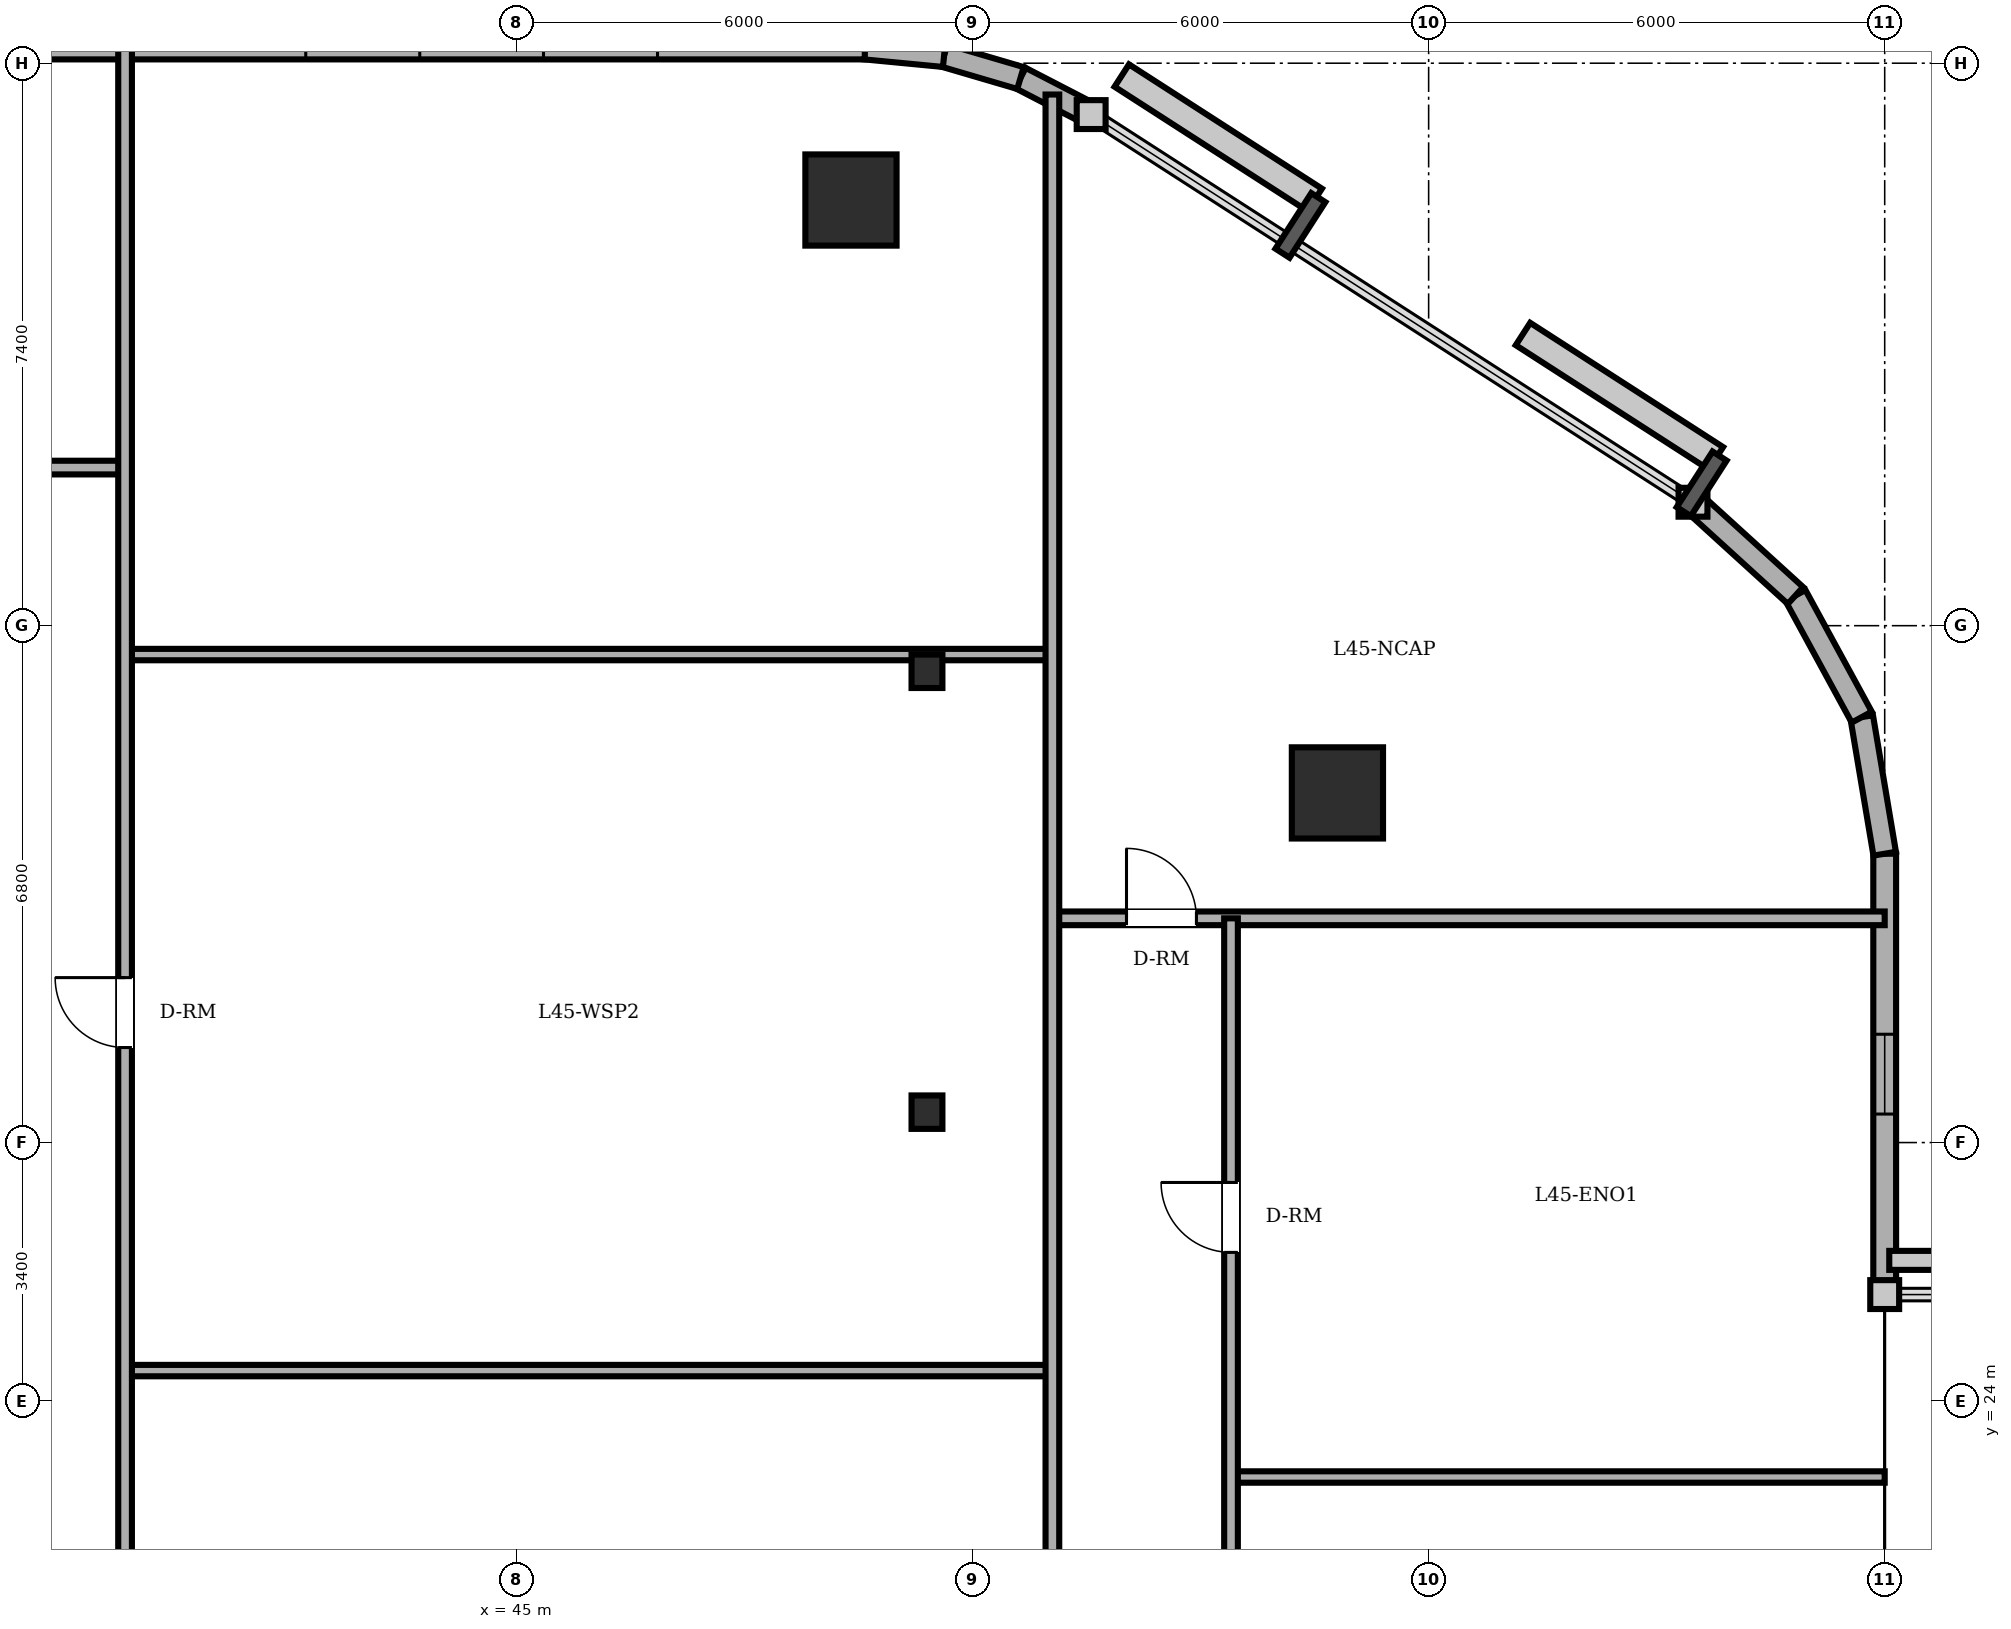
"""IFC4 building model, lengths in metres.
Left out: names, types, materials, properties, quantities, classifications, styles, units other than length and angle.
Written with IfcOpenShell. Run it as: python <this file> out.ifc"""

import sys

from ifc_helpers import new_model, si_unit, direction, frame, frame_2d, origin, origin_2d, place, context, subcontext, project, spatial, rectangle, circle, i_section, extrude, element, fill, save


model = new_model("IFC4")
c1 = context("Model", 3, precision=1e-05, world=origin(), true_north=direction((0.0, 1.0)))
c2 = subcontext(c1, "Body", "Model", "MODEL_VIEW")
j1 = project(units=[si_unit("LENGTHUNIT", "METRE"), si_unit("PLANEANGLEUNIT", "RADIAN")], contexts=[c1])
p1 = place(None, origin())
s1 = spatial("IfcSite", under=j1, at=p1, CompositionType="ELEMENT")
p2 = place(p1, origin())
s2 = spatial("IfcBuilding", under=s1, at=p2, CompositionType="ELEMENT")
p3 = place(p2, frame((0.0, 0.0, 172.6)))
s3 = spatial("IfcBuildingStorey", under=s2, at=p3, CompositionType="ELEMENT", Elevation=172.6)
for number, where, z_axis, x_axis in (
    (1, (55.8, 32.0, 0.0), (0.0, 0.0, 1.0), (1.0, 0.0, 0.0)),
    (2, (49.4, 39.8, 0.0), (0.0, 0.0, 1.0), (1.0, 0.0, 0.0)),
):
    element("IfcColumn", number, at=place(p3, frame(where, z_axis=z_axis, x_axis=x_axis)), inside=s3, PredefinedType="COLUMN", context=c2, shape_type="SweptSolid", body=[
        extrude(circle(Radius=0.6, at=origin_2d()), origin(), (0.0, 0.0, 1.0), 3.6),
    ])
for number, where, z_axis, x_axis in (
    (3, (50.4, 27.8, 0.0), (0.0, 0.0, 1.0), (1.0, 0.0, 0.0)),
    (4, (50.4, 33.6, 0.0), (0.0, 0.0, 1.0), (1.0, 0.0, 0.0)),
):
    element("IfcColumn", number, at=place(p3, frame(where, z_axis=z_axis, x_axis=x_axis)), inside=s3, PredefinedType="COLUMN", context=c2, shape_type="SweptSolid", body=[
        extrude(i_section(OverallWidth=0.406, OverallDepth=0.44, WebThickness=0.024, FlangeThickness=0.039, FilletRadius=0.015, at=origin_2d()), origin(), (0.0, 0.0, 1.0), 3.6),
    ])
p4 = place(p3, frame((63.0, 25.4, 0.0), z_axis=(0.0, 0.0, 1.0), x_axis=(0.0, 1.0, 0.0)))
e5 = element("IfcWall", 5, at=p4, inside=s3, PredefinedType="SOLIDWALL", context=c2, shape_type="SweptSolid", body=[
    extrude(rectangle(XDim=5.8, YDim=0.3, at=frame_2d((2.9, 0.0))), origin(), (0.0, 0.0, 1.0), 3.4),
])
p5 = place(p4, frame((2.375, 0.0, 0.85)))
e6 = element("IfcOpeningElement", 6, at=p5, cuts=e5, PredefinedType="OPENING", context=c2, shape_type="SweptSolid", body=[
    extrude(rectangle(XDim=1.05, YDim=1.55, at=frame_2d((0.525, 0.775))), frame((0.0, 0.16, 0.0), z_axis=(0.0, -1.0, 0.0), x_axis=(1.0, 0.0, 0.0)), (0.0, 0.0, 1.0), 0.32),
])
p6 = place(p3, frame((63.0, 31.2, 0.0), z_axis=(0.0, 0.0, 1.0), x_axis=(-0.165724081207, 0.986172159873, 0.0)))
e7 = element("IfcWall", 7, at=p6, inside=s3, PredefinedType="SOLIDWALL", context=c2, shape_type="SweptSolid", body=[
    extrude(rectangle(XDim=1.822, YDim=0.3, at=frame_2d((0.911, 0.0))), origin(), (0.0, 0.0, 1.0), 3.4),
])
p7 = place(p3, frame((62.698, 32.997, 0.0), z_axis=(0.0, 0.0, 1.0), x_axis=(-0.478608030646, 0.878028674362, 0.0)))
e8 = element("IfcWall", 8, at=p7, inside=s3, PredefinedType="SOLIDWALL", context=c2, shape_type="SweptSolid", body=[
    extrude(rectangle(XDim=1.822, YDim=0.3, at=frame_2d((0.911, 0.0))), origin(), (0.0, 0.0, 1.0), 3.4),
])
p8 = place(p3, frame((61.826, 34.597, 0.0), z_axis=(0.0, 0.0, 1.0), x_axis=(-0.73947929393, 0.673179302897, 0.0)))
e9 = element("IfcWall", 9, at=p8, inside=s3, PredefinedType="SOLIDWALL", context=c2, shape_type="SweptSolid", body=[
    extrude(rectangle(XDim=1.823, YDim=0.3, at=frame_2d((0.911, 0.0))), origin(), (0.0, 0.0, 1.0), 3.4),
])
p9 = place(p3, frame((52.56, 40.924, 0.0), z_axis=(0.0, 0.0, 1.0), x_axis=(-0.888283247196, 0.459296062198, 0.0)))
e10 = element("IfcWall", 10, at=p9, inside=s3, PredefinedType="SOLIDWALL", context=c2, shape_type="SweptSolid", body=[
    extrude(rectangle(XDim=1.047, YDim=0.3, at=frame_2d((0.523, 0.0))), origin(), (0.0, 0.0, 1.0), 3.4),
])
p10 = place(p3, frame((51.63, 41.405, 0.0), z_axis=(0.0, 0.0, 1.0), x_axis=(-0.959528674476, 0.281610942363, 0.0)))
e11 = element("IfcWall", 11, at=p10, inside=s3, PredefinedType="SOLIDWALL", context=c2, shape_type="SweptSolid", body=[
    extrude(rectangle(XDim=1.047, YDim=0.3, at=frame_2d((0.524, 0.0))), origin(), (0.0, 0.0, 1.0), 3.4),
])
p11 = place(p3, frame((50.625, 41.7, 0.0), z_axis=(0.0, 0.0, 1.0), x_axis=(-0.995426089968, 0.095534807324, 0.0)))
e12 = element("IfcWall", 12, at=p11, inside=s3, PredefinedType="SOLIDWALL", context=c2, shape_type="SweptSolid", body=[
    extrude(rectangle(XDim=1.048, YDim=0.3, at=frame_2d((0.524, 0.0))), origin(), (0.0, 0.0, 1.0), 3.4),
])
p12 = place(p3, frame((49.582, 41.8, 0.0), z_axis=(0.0, 0.0, 1.0), x_axis=(-1.0, 0.0, 0.0)))
e13 = element("IfcWall", 13, at=p12, inside=s3, PredefinedType="SOLIDWALL", context=c2, shape_type="SweptSolid", body=[
    extrude(rectangle(XDim=30.282, YDim=0.3, at=frame_2d((15.141, 0.0))), origin(), (0.0, 0.0, 1.0), 3.4),
])
p13 = place(p12, frame((25.407, 0.0, 0.0)))
e14 = element("IfcOpeningElement", 14, at=p13, cuts=e13, PredefinedType="OPENING", context=c2, shape_type="SweptSolid", body=[
    extrude(rectangle(XDim=0.95, YDim=2.2, at=frame_2d((0.475, 1.1))), frame((0.0, 0.16, 0.0), z_axis=(0.0, -1.0, 0.0), x_axis=(1.0, 0.0, 0.0)), (0.0, 0.0, 1.0), 0.32),
])
p14 = place(p12, frame((2.727, 0.0, 0.85)))
e15 = element("IfcOpeningElement", 15, at=p14, cuts=e13, PredefinedType="OPENING", context=c2, shape_type="SweptSolid", body=[
    extrude(rectangle(XDim=1.5, YDim=1.55, at=frame_2d((0.75, 0.775))), frame((0.0, 0.16, 0.0), z_axis=(0.0, -1.0, 0.0), x_axis=(1.0, 0.0, 0.0)), (0.0, 0.0, 1.0), 0.32),
])
p15 = place(p12, frame((5.855, 0.0, 0.85)))
e16 = element("IfcOpeningElement", 16, at=p15, cuts=e13, PredefinedType="OPENING", context=c2, shape_type="SweptSolid", body=[
    extrude(rectangle(XDim=1.5, YDim=1.55, at=frame_2d((0.75, 0.775))), frame((0.0, 0.16, 0.0), z_axis=(0.0, -1.0, 0.0), x_axis=(1.0, 0.0, 0.0)), (0.0, 0.0, 1.0), 0.32),
])
p16 = place(p12, frame((11.665, 0.0, 0.85)))
e17 = element("IfcOpeningElement", 17, at=p16, cuts=e13, PredefinedType="OPENING", context=c2, shape_type="SweptSolid", body=[
    extrude(rectangle(XDim=1.5, YDim=1.55, at=frame_2d((0.75, 0.775))), frame((0.0, 0.16, 0.0), z_axis=(0.0, -1.0, 0.0), x_axis=(1.0, 0.0, 0.0)), (0.0, 0.0, 1.0), 0.32),
])
p17 = place(p12, frame((14.349, 0.0, 0.85)))
e18 = element("IfcOpeningElement", 18, at=p17, cuts=e13, PredefinedType="OPENING", context=c2, shape_type="SweptSolid", body=[
    extrude(rectangle(XDim=1.5, YDim=1.55, at=frame_2d((0.75, 0.775))), frame((0.0, 0.16, 0.0), z_axis=(0.0, -1.0, 0.0), x_axis=(1.0, 0.0, 0.0)), (0.0, 0.0, 1.0), 0.32),
])
p18 = place(p12, frame((18.932, 0.0, 0.85)))
e19 = element("IfcOpeningElement", 19, at=p18, cuts=e13, PredefinedType="OPENING", context=c2, shape_type="SweptSolid", body=[
    extrude(rectangle(XDim=1.5, YDim=1.55, at=frame_2d((0.75, 0.775))), frame((0.0, 0.16, 0.0), z_axis=(0.0, -1.0, 0.0), x_axis=(1.0, 0.0, 0.0)), (0.0, 0.0, 1.0), 0.32),
])
p19 = place(p12, frame((22.532, 0.0, 0.85)))
e20 = element("IfcOpeningElement", 20, at=p19, cuts=e13, PredefinedType="OPENING", context=c2, shape_type="SweptSolid", body=[
    extrude(rectangle(XDim=1.5, YDim=1.55, at=frame_2d((0.75, 0.775))), frame((0.0, 0.16, 0.0), z_axis=(0.0, -1.0, 0.0), x_axis=(1.0, 0.0, 0.0)), (0.0, 0.0, 1.0), 0.32),
])
p20 = place(p12, frame((27.532, 0.0, 0.85)))
e21 = element("IfcOpeningElement", 21, at=p20, cuts=e13, PredefinedType="OPENING", context=c2, shape_type="SweptSolid", body=[
    extrude(rectangle(XDim=1.5, YDim=1.55, at=frame_2d((0.75, 0.775))), frame((0.0, 0.16, 0.0), z_axis=(0.0, -1.0, 0.0), x_axis=(1.0, 0.0, 0.0)), (0.0, 0.0, 1.0), 0.32),
])
p21 = place(p3, frame((54.4, 23.0, 0.0), z_axis=(0.0, 0.0, 1.0), x_axis=(1.0, 0.0, 0.0)))
e22 = element("IfcWall", 22, at=p21, inside=s3, PredefinedType="PARTITIONING", context=c2, shape_type="SweptSolid", body=[
    extrude(rectangle(XDim=8.6, YDim=0.15, at=frame_2d((4.3, 0.0))), origin(), (0.0, 0.0, 1.0), 3.4),
])
p22 = place(p3, frame((39.85, 24.4, 0.0), z_axis=(0.0, 0.0, 1.0), x_axis=(1.0, 0.0, 0.0)))
e23 = element("IfcWall", 23, at=p22, inside=s3, PredefinedType="PARTITIONING", context=c2, shape_type="SweptSolid", body=[
    extrude(rectangle(XDim=12.2, YDim=0.15, at=frame_2d((6.1, 0.0))), origin(), (0.0, 0.0, 1.0), 3.4),
])
p23 = place(p3, frame((52.05, 30.35, 0.0), z_axis=(0.0, 0.0, 1.0), x_axis=(1.0, 0.0, 0.0)))
e24 = element("IfcWall", 24, at=p23, inside=s3, PredefinedType="PARTITIONING", context=c2, shape_type="SweptSolid", body=[
    extrude(rectangle(XDim=10.95, YDim=0.18, at=frame_2d((5.475, 0.0))), origin(), (0.0, 0.0, 1.0), 3.4),
])
p24 = place(p23, frame((0.975, 0.0, 0.0)))
e25 = element("IfcOpeningElement", 25, at=p24, cuts=e24, PredefinedType="OPENING", context=c2, shape_type="SweptSolid", body=[
    extrude(rectangle(XDim=0.92, YDim=2.1, at=frame_2d((0.46, 1.05))), frame((0.0, 0.1, 0.0), z_axis=(0.0, -1.0, 0.0), x_axis=(1.0, 0.0, 0.0)), (0.0, 0.0, 1.0), 0.2),
])
p25 = place(p3, frame((39.85, 33.82, 0.0), z_axis=(0.0, 0.0, 1.0), x_axis=(1.0, 0.0, 0.0)))
e26 = element("IfcWall", 26, at=p25, inside=s3, PredefinedType="PARTITIONING", context=c2, shape_type="SweptSolid", body=[
    extrude(rectangle(XDim=12.2, YDim=0.15, at=frame_2d((6.1, 0.0))), origin(), (0.0, 0.0, 1.0), 2.932),
])
p26 = place(p3, frame((13.8, 36.28, 0.0), z_axis=(0.0, 0.0, 1.0), x_axis=(1.0, 0.0, 0.0)))
e27 = element("IfcWall", 27, at=p26, inside=s3, PredefinedType="PARTITIONING", context=c2, shape_type="SweptSolid", body=[
    extrude(rectangle(XDim=26.05, YDim=0.18, at=frame_2d((13.025, 0.0))), origin(), (0.0, 0.0, 1.0), 3.4),
])
p27 = place(p26, frame((12.05, 0.0, 0.0)))
e28 = element("IfcOpeningElement", 28, at=p27, cuts=e27, PredefinedType="OPENING", context=c2, shape_type="SweptSolid", body=[
    extrude(rectangle(XDim=0.9, YDim=2.1, at=frame_2d((0.45, 1.05))), frame((0.0, 0.1, 0.0), z_axis=(0.0, -1.0, 0.0), x_axis=(1.0, 0.0, 0.0)), (0.0, 0.0, 1.0), 0.2),
])
p28 = place(p26, frame((15.67, 0.0, 0.0)))
e29 = element("IfcOpeningElement", 29, at=p28, cuts=e27, PredefinedType="OPENING", context=c2, shape_type="SweptSolid", body=[
    extrude(rectangle(XDim=0.86, YDim=2.1, at=frame_2d((0.43, 1.05))), frame((0.0, 0.1, 0.0), z_axis=(0.0, -1.0, 0.0), x_axis=(1.0, 0.0, 0.0)), (0.0, 0.0, 1.0), 0.2),
])
p29 = place(p26, frame((5.54, 0.0, 0.0)))
e30 = element("IfcOpeningElement", 30, at=p29, cuts=e27, PredefinedType="OPENING", context=c2, shape_type="SweptSolid", body=[
    extrude(rectangle(XDim=0.92, YDim=2.1, at=frame_2d((0.46, 1.05))), frame((0.0, 0.1, 0.0), z_axis=(0.0, -1.0, 0.0), x_axis=(1.0, 0.0, 0.0)), (0.0, 0.0, 1.0), 0.2),
])
p30 = place(p26, frame((21.305, 0.0, 0.0)))
e31 = element("IfcOpeningElement", 31, at=p30, cuts=e27, PredefinedType="OPENING", context=c2, shape_type="SweptSolid", body=[
    extrude(rectangle(XDim=0.92, YDim=2.1, at=frame_2d((0.46, 1.05))), frame((0.0, 0.1, 0.0), z_axis=(0.0, -1.0, 0.0), x_axis=(1.0, 0.0, 0.0)), (0.0, 0.0, 1.0), 0.2),
])
p31 = place(p3, frame((39.85, 14.18, 0.0), z_axis=(0.0, 0.0, 1.0), x_axis=(0.0, 1.0, 0.0)))
e32 = element("IfcWall", 32, at=p31, inside=s3, PredefinedType="PARTITIONING", context=c2, shape_type="SweptSolid", body=[
    extrude(rectangle(XDim=27.62, YDim=0.18, at=frame_2d((13.81, 0.0))), origin(), (0.0, 0.0, 1.0), 3.4),
])
p32 = place(p31, frame((14.47, 0.0, 0.0)))
e33 = element("IfcOpeningElement", 33, at=p32, cuts=e32, PredefinedType="OPENING", context=c2, shape_type="SweptSolid", body=[
    extrude(rectangle(XDim=0.92, YDim=2.1, at=frame_2d((0.46, 1.05))), frame((0.0, 0.1, 0.0), z_axis=(0.0, -1.0, 0.0), x_axis=(1.0, 0.0, 0.0)), (0.0, 0.0, 1.0), 0.2),
])
p33 = place(p3, frame((52.05, 14.18, 0.0), z_axis=(0.0, 0.0, 1.0), x_axis=(0.0, 1.0, 0.0)))
e34 = element("IfcWall", 34, at=p33, inside=s3, PredefinedType="PARTITIONING", context=c2, shape_type="SweptSolid", body=[
    extrude(rectangle(XDim=27.008, YDim=0.18, at=frame_2d((13.504, 0.0))), origin(), (0.0, 0.0, 1.0), 3.4),
])
p34 = place(p3, frame((54.4, 8.261, 0.0), z_axis=(0.0, 0.0, 1.0), x_axis=(0.0, 1.0, 0.0)))
e35 = element("IfcWall", 35, at=p34, inside=s3, PredefinedType="PARTITIONING", context=c2, shape_type="SweptSolid", body=[
    extrude(rectangle(XDim=22.089, YDim=0.18, at=frame_2d((11.044, 0.0))), origin(), (0.0, 0.0, 1.0), 3.4),
])
p35 = place(p34, frame((17.694, 0.0, 0.0)))
e36 = element("IfcOpeningElement", 36, at=p35, cuts=e35, PredefinedType="OPENING", context=c2, shape_type="SweptSolid", body=[
    extrude(rectangle(XDim=0.92, YDim=2.1, at=frame_2d((0.46, 1.05))), frame((0.0, 0.1, 0.0), z_axis=(0.0, -1.0, 0.0), x_axis=(1.0, 0.0, 0.0)), (0.0, 0.0, 1.0), 0.2),
])
p36 = place(p34, frame((10.771, 0.0, 0.0)))
e37 = element("IfcOpeningElement", 37, at=p36, cuts=e35, PredefinedType="OPENING", context=c2, shape_type="SweptSolid", body=[
    extrude(rectangle(XDim=0.92, YDim=2.1, at=frame_2d((0.46, 1.05))), frame((0.0, 0.1, 0.0), z_axis=(0.0, -1.0, 0.0), x_axis=(1.0, 0.0, 0.0)), (0.0, 0.0, 1.0), 0.2),
])
p37 = place(p5, origin())
e38 = element("IfcWindow", 38, at=p37, inside=s3, PartitioningType="SINGLE_PANEL", PredefinedType="WINDOW", context=c2, shape_type="SweptSolid", body=[
    extrude(rectangle(XDim=1.05, YDim=1.55, at=frame_2d((0.525, 0.775))), frame((0.0, 0.03, 0.0), z_axis=(0.0, -1.0, 0.0), x_axis=(1.0, 0.0, 0.0)), (0.0, 0.0, 1.0), 0.06),
])
fill(e6, e38)
p38 = place(p32, origin())
e39 = element("IfcDoor", 39, at=p38, inside=s3, OperationType="SINGLE_SWING_RIGHT", PredefinedType="DOOR", context=c2, shape_type="SweptSolid", body=[
    extrude(rectangle(XDim=0.92, YDim=2.1, at=frame_2d((0.46, 1.05))), frame((0.0, 0.025, 0.0), z_axis=(0.0, -1.0, 0.0), x_axis=(1.0, 0.0, 0.0)), (0.0, 0.0, 1.0), 0.05),
])
fill(e33, e39)
p39 = place(p24, origin())
e40 = element("IfcDoor", 40, at=p39, inside=s3, OperationType="SINGLE_SWING_LEFT", PredefinedType="DOOR", context=c2, shape_type="SweptSolid", body=[
    extrude(rectangle(XDim=0.92, YDim=2.1, at=frame_2d((0.46, 1.05))), frame((0.0, 0.025, 0.0), z_axis=(0.0, -1.0, 0.0), x_axis=(1.0, 0.0, 0.0)), (0.0, 0.0, 1.0), 0.05),
])
fill(e25, e40)
p40 = place(p35, origin())
e41 = element("IfcDoor", 41, at=p40, inside=s3, OperationType="SINGLE_SWING_RIGHT", PredefinedType="DOOR", context=c2, shape_type="SweptSolid", body=[
    extrude(rectangle(XDim=0.92, YDim=2.1, at=frame_2d((0.46, 1.05))), frame((0.0, 0.025, 0.0), z_axis=(0.0, -1.0, 0.0), x_axis=(1.0, 0.0, 0.0)), (0.0, 0.0, 1.0), 0.05),
])
fill(e36, e41)
save(model, sys.argv[1])
